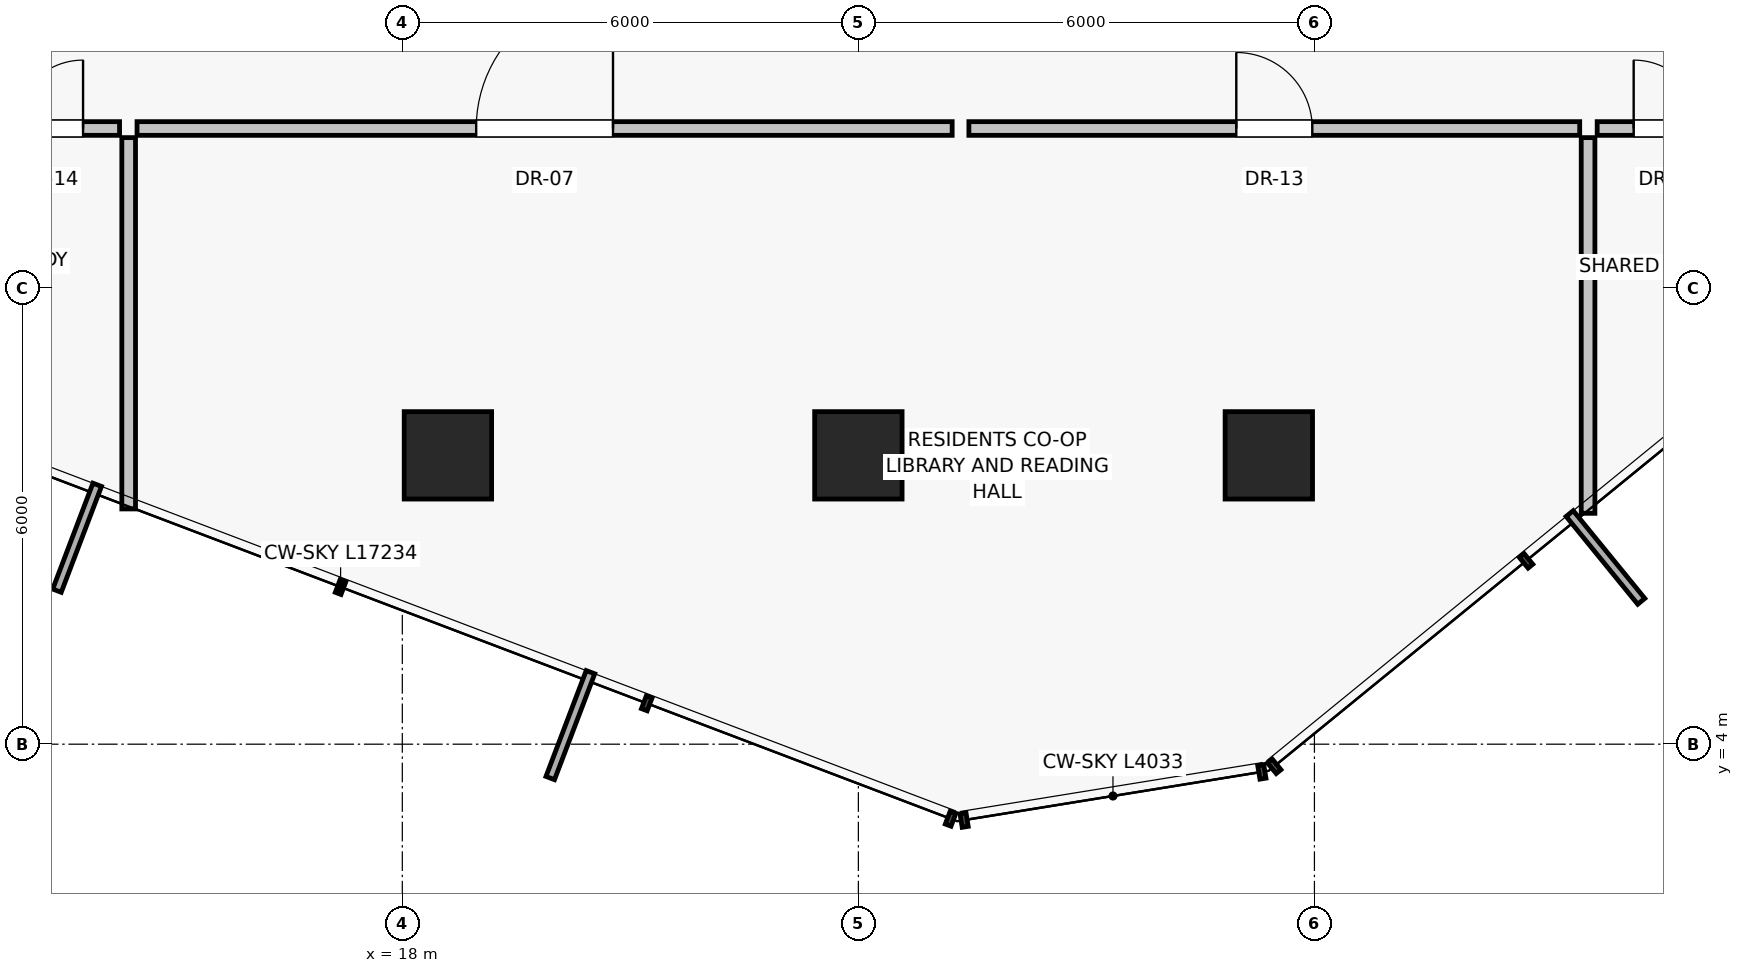
"""IFC4 building model, lengths in metres.
Left out: names, types, materials, properties, quantities, classifications, styles, units other than length and angle.
Written with IfcOpenShell. Run it as: python <this file> out.ifc"""

import sys

from ifc_helpers import new_model, si_unit, direction, frame, frame_2d, origin, origin_2d, place, context, subcontext, project, spatial, rectangle, extrude, source, transform, mapped, element, fill, save


model = new_model("IFC4")
c1 = context("Model", 3, precision=1e-05, world=origin(), true_north=direction((0.0, 1.0)))
c2 = subcontext(c1, "Body", "Model", "MODEL_VIEW")
j1 = project(units=[si_unit("LENGTHUNIT", "METRE"), si_unit("PLANEANGLEUNIT", "RADIAN")], contexts=[c1])
p1 = place(None, origin())
s1 = spatial("IfcSite", under=j1, at=p1, CompositionType="ELEMENT")
p2 = place(p1, origin())
s2 = spatial("IfcBuilding", under=s1, at=p2, CompositionType="ELEMENT")
p3 = place(p2, frame((0.0, 0.0, 158.75)))
s3 = spatial("IfcBuildingStorey", under=s2, at=p3, CompositionType="ELEMENT", Elevation=158.75)
for number, where, z_axis, x_axis in (
    (1, (18.6, 7.8, 0.0), (0.0, 0.0, 1.0), (1.0, 0.0, 0.0)),
    (2, (24.0, 7.8, 0.0), (0.0, 0.0, 1.0), (1.0, 0.0, 0.0)),
    (3, (29.4, 7.8, 0.0), (0.0, 0.0, 1.0), (1.0, 0.0, 0.0)),
):
    element("IfcColumn", number, at=place(p3, frame(where, z_axis=z_axis, x_axis=x_axis)), inside=s3, PredefinedType="COLUMN", context=c2, shape_type="SweptSolid", body=[
        extrude(rectangle(XDim=1.15, YDim=1.15, at=origin_2d()), origin(), (0.0, 0.0, 1.0), 4.3),
    ])
p4 = place(p3, frame((14.4, 11.98, 0.0), z_axis=(0.0, 0.0, 1.0), x_axis=(0.0, -1.0, 0.0)))
e4 = element("IfcWall", 4, at=p4, inside=s3, PredefinedType="PARTITIONING", context=c2, shape_type="SweptSolid", body=[
    extrude(rectangle(XDim=4.885, YDim=0.18, at=frame_2d((2.443, 0.0))), origin(), (0.0, 0.0, 1.0), 4.05),
])
p5 = place(p3, frame((33.6, 11.98, 0.0), z_axis=(0.0, 0.0, 1.0), x_axis=(0.0, -1.0, 0.0)))
e5 = element("IfcWall", 5, at=p5, inside=s3, PredefinedType="PARTITIONING", context=c2, shape_type="SweptSolid", body=[
    extrude(rectangle(XDim=4.942, YDim=0.18, at=frame_2d((2.471, 0.0))), origin(), (0.0, 0.0, 1.0), 4.05),
])
p6 = place(p3, frame((14.51, 12.1, 0.0), z_axis=(0.0, 0.0, 1.0), x_axis=(1.0, 0.0, 0.0)))
e6 = element("IfcWall", 6, at=p6, inside=s3, PredefinedType="PARTITIONING", context=c2, shape_type="SweptSolid", body=[
    extrude(rectangle(XDim=10.724, YDim=0.18, at=frame_2d((5.362, 0.0))), origin(), (0.0, 0.0, 1.0), 3.63),
])
p7 = place(p6, frame((4.462, 0.0, 0.0)))
e7 = element("IfcOpeningElement", 7, at=p7, cuts=e6, PredefinedType="OPENING", context=c2, shape_type="SweptSolid", body=[
    extrude(rectangle(XDim=1.8, YDim=2.25, at=frame_2d((0.9, 1.125))), frame((0.0, 0.1, 0.0), z_axis=(0.0, -1.0, 0.0), x_axis=(1.0, 0.0, 0.0)), (0.0, 0.0, 1.0), 0.2),
])
p8 = place(p3, frame((25.454, 12.1, 0.0), z_axis=(0.0, 0.0, 1.0), x_axis=(1.0, 0.0, 0.0)))
e8 = element("IfcWall", 8, at=p8, inside=s3, PredefinedType="PARTITIONING", context=c2, shape_type="SweptSolid", body=[
    extrude(rectangle(XDim=8.036, YDim=0.18, at=frame_2d((4.018, 0.0))), origin(), (0.0, 0.0, 1.0), 3.63),
])
p9 = place(p8, frame((3.518, 0.0, 0.0)))
e9 = element("IfcOpeningElement", 9, at=p9, cuts=e8, PredefinedType="OPENING", context=c2, shape_type="SweptSolid", body=[
    extrude(rectangle(XDim=1.0, YDim=2.01, at=frame_2d((0.5, 1.005))), frame((0.0, 0.1, 0.0), z_axis=(0.0, -1.0, 0.0), x_axis=(1.0, 0.0, 0.0)), (0.0, 0.0, 1.0), 0.2),
])
p10 = place(p3, frame((12.42, 12.1, 0.0), z_axis=(0.0, 0.0, 1.0), x_axis=(1.0, 0.0, 0.0)))
e10 = element("IfcWall", 10, at=p10, inside=s3, PredefinedType="PARTITIONING", context=c2, shape_type="SweptSolid", body=[
    extrude(rectangle(XDim=1.86, YDim=0.18, at=frame_2d((0.93, 0.0))), origin(), (0.0, 0.0, 1.0), 4.05),
])
p11 = place(p10, frame((0.48, 0.0, 0.0)))
e11 = element("IfcOpeningElement", 11, at=p11, cuts=e10, PredefinedType="OPENING", context=c2, shape_type="SweptSolid", body=[
    extrude(rectangle(XDim=0.9, YDim=2.01, at=frame_2d((0.45, 1.005))), frame((0.0, 0.1, 0.0), z_axis=(0.0, -1.0, 0.0), x_axis=(1.0, 0.0, 0.0)), (0.0, 0.0, 1.0), 0.2),
])
p12 = place(p3, frame((33.72, 12.1, 0.0), z_axis=(0.0, 0.0, 1.0), x_axis=(1.0, 0.0, 0.0)))
e12 = element("IfcWall", 12, at=p12, inside=s3, PredefinedType="PARTITIONING", context=c2, shape_type="SweptSolid", body=[
    extrude(rectangle(XDim=1.86, YDim=0.18, at=frame_2d((0.93, 0.0))), origin(), (0.0, 0.0, 1.0), 4.05),
])
p13 = place(p12, frame((0.48, 0.0, 0.0)))
e13 = element("IfcOpeningElement", 13, at=p13, cuts=e12, PredefinedType="OPENING", context=c2, shape_type="SweptSolid", body=[
    extrude(rectangle(XDim=0.9, YDim=2.01, at=frame_2d((0.45, 1.005))), frame((0.0, 0.1, 0.0), z_axis=(0.0, -1.0, 0.0), x_axis=(1.0, 0.0, 0.0)), (0.0, 0.0, 1.0), 0.2),
])
m1 = source(origin(), c2, "Body", "SweptSolid", [
    extrude(rectangle(XDim=1.8, YDim=2.25, at=frame_2d((0.9, 1.125))), frame((0.0, 0.025, 0.0), z_axis=(0.0, -1.0, 0.0), x_axis=(1.0, 0.0, 0.0)), (0.0, 0.0, 1.0), 0.05),
])
p14 = place(p7, origin())
e14 = element("IfcDoor", 14, at=p14, inside=s3, OperationType="SINGLE_SWING_RIGHT", PredefinedType="DOOR", context=c2, shape_type="MappedRepresentation", body=[
    mapped(m1, transform((0.0, 0.0, 0.0), scale=1.0)),
])
fill(e7, e14)
m2 = source(origin(), c2, "Body", "SweptSolid", [
    extrude(rectangle(XDim=1.0, YDim=2.01, at=frame_2d((0.5, 1.005))), frame((0.0, 0.025, 0.0), z_axis=(0.0, -1.0, 0.0), x_axis=(1.0, 0.0, 0.0)), (0.0, 0.0, 1.0), 0.05),
])
p15 = place(p9, origin())
e15 = element("IfcDoor", 15, at=p15, inside=s3, OperationType="SINGLE_SWING_LEFT", PredefinedType="DOOR", context=c2, shape_type="MappedRepresentation", body=[
    mapped(m2, transform((0.0, 0.0, 0.0), scale=1.0)),
])
fill(e9, e15)
m3 = source(origin(), c2, "Body", "SweptSolid", [
    extrude(rectangle(XDim=0.9, YDim=2.01, at=frame_2d((0.45, 1.005))), frame((0.0, 0.025, 0.0), z_axis=(0.0, -1.0, 0.0), x_axis=(1.0, 0.0, 0.0)), (0.0, 0.0, 1.0), 0.05),
])
p16 = place(p11, origin())
e16 = element("IfcDoor", 16, at=p16, inside=s3, OperationType="SINGLE_SWING_RIGHT", PredefinedType="DOOR", context=c2, shape_type="MappedRepresentation", body=[
    mapped(m3, transform((0.0, 0.0, 0.0), scale=1.0)),
])
fill(e11, e16)
p17 = place(p13, origin())
e17 = element("IfcDoor", 17, at=p17, inside=s3, OperationType="SINGLE_SWING_LEFT", PredefinedType="DOOR", context=c2, shape_type="MappedRepresentation", body=[
    mapped(m3, transform((0.0, 0.0, 0.0), scale=1.0)),
])
fill(e13, e17)
save(model, sys.argv[1])
